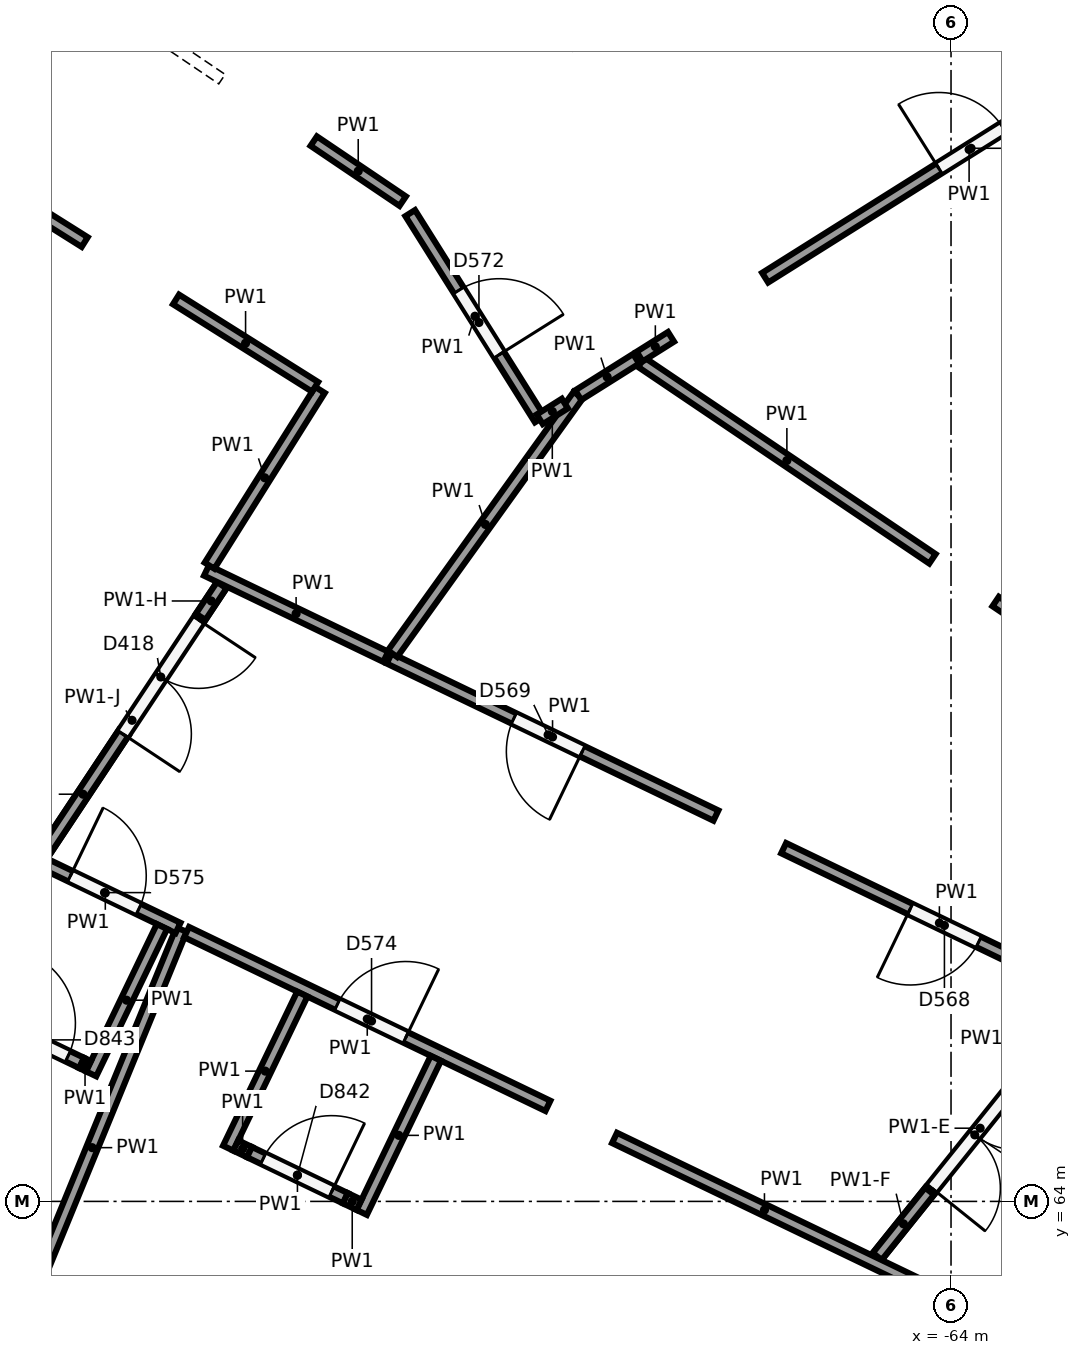
"""IFC4 building model, lengths in metres.
Left out: names, types, materials, properties, quantities, classifications, styles, units other than length and angle.
Written with IfcOpenShell. Run it as: python <this file> out.ifc"""

import sys

from ifc_helpers import new_model, si_unit, direction, frame, frame_2d, origin, origin_2d, place, context, subcontext, project, spatial, rectangle, circle, extrude, element, fill, save


model = new_model("IFC4")
c1 = context("Model", 3, precision=1e-05, world=origin(), true_north=direction((0.0, 1.0)))
c2 = subcontext(c1, "Body", "Model", "MODEL_VIEW")
j1 = project(units=[si_unit("LENGTHUNIT", "METRE"), si_unit("PLANEANGLEUNIT", "RADIAN")], contexts=[c1])
p1 = place(None, origin())
s1 = spatial("IfcSite", under=j1, at=p1, CompositionType="ELEMENT")
p2 = place(p1, origin())
s2 = spatial("IfcBuilding", under=s1, at=p2, CompositionType="ELEMENT")
p3 = place(p2, origin())
s3 = spatial("IfcBuildingStorey", under=s2, at=p3, CompositionType="ELEMENT", Elevation=0.0)
p4 = place(p3, frame((-63.068, 73.47, 0.0), z_axis=(0.0, 0.0, 1.0), x_axis=(1.0, 0.0, 0.0)))
e1 = element("IfcColumn", 1, at=p4, inside=s3, PredefinedType="COLUMN", context=c2, shape_type="SweptSolid", body=[
    extrude(circle(Radius=0.45, at=origin_2d()), origin(), (0.0, 0.0, 1.0), 6.5),
])
p5 = place(p3, frame((-72.312, 79.091, 0.0), z_axis=(0.0, 0.0, 1.0), x_axis=(1.0, 0.0, 0.0)))
e2 = element("IfcColumn", 2, at=p5, inside=s3, PredefinedType="COLUMN", context=c2, shape_type="SweptSolid", body=[
    extrude(circle(Radius=0.5, at=origin_2d()), origin(), (0.0, 0.0, 1.0), 6.5),
])
p6 = place(p3, frame((-67.972, 67.058, 0.0), z_axis=(0.0, 0.0, 1.0), x_axis=(1.0, 0.0, 0.0)))
e3 = element("IfcColumn", 3, at=p6, inside=s3, PredefinedType="COLUMN", context=c2, shape_type="SweptSolid", body=[
    extrude(circle(Radius=0.45, at=origin_2d()), origin(), (0.0, 0.0, 1.0), 6.5),
])
p7 = place(p3, frame((-62.104, 66.677, 0.0), z_axis=(0.0, 0.0, 1.0), x_axis=(-0.901215323509, 0.433371596523, 0.0)))
e4 = element("IfcWall", 4, at=p7, inside=s3, PredefinedType="PARTITIONING", context=c2, shape_type="SweptSolid", body=[
    extrude(rectangle(XDim=4.547, YDim=0.15, at=frame_2d((2.273, 0.0))), origin(), (0.0, 0.0, 1.0), 6.15),
])
p8 = place(p7, frame((1.7, 0.0, 0.0)))
e5 = element("IfcOpeningElement", 5, at=p8, cuts=e4, PredefinedType="OPENING", context=c2, shape_type="SweptSolid", body=[
    extrude(rectangle(XDim=1.0, YDim=2.1, at=frame_2d((0.5, 1.05))), frame((0.0, 0.085, 0.0), z_axis=(0.0, -1.0, 0.0), x_axis=(1.0, 0.0, 0.0)), (0.0, 0.0, 1.0), 0.17),
])
p9 = place(p3, frame((-63.413, 71.893, 0.0), z_axis=(0.0, 0.0, 1.0), x_axis=(0.828828529776, -0.559502697249, 0.0)))
e6 = element("IfcWall", 6, at=p9, inside=s3, PredefinedType="PARTITIONING", context=c2, shape_type="SweptSolid", body=[
    extrude(rectangle(XDim=4.215, YDim=0.15, at=frame_2d((2.107, 0.0))), origin(), (0.0, 0.0, 1.0), 6.15),
])
p10 = place(p3, frame((-67.094, 69.076, 0.0), z_axis=(0.0, 0.0, 1.0), x_axis=(-0.901200145097, 0.433403159284, 0.0)))
e7 = element("IfcWall", 7, at=p10, inside=s3, PredefinedType="PARTITIONING", context=c2, shape_type="SweptSolid", body=[
    extrude(rectangle(XDim=4.77, YDim=0.15, at=frame_2d((2.385, 0.0))), origin(), (0.0, 0.0, 1.0), 6.15),
])
p11 = place(p10, frame((1.95, 0.0, 0.0)))
e8 = element("IfcOpeningElement", 8, at=p11, cuts=e7, PredefinedType="OPENING", context=c2, shape_type="SweptSolid", body=[
    extrude(rectangle(XDim=1.0, YDim=2.1, at=frame_2d((0.5, 1.05))), frame((0.0, 0.085, 0.0), z_axis=(0.0, -1.0, 0.0), x_axis=(1.0, 0.0, 0.0)), (0.0, 0.0, 1.0), 0.17),
])
p12 = place(p3, frame((-71.348, 71.206, 0.0), z_axis=(0.0, 0.0, 1.0), x_axis=(0.583304436704, 0.812253614409, 0.0)))
e9 = element("IfcWall", 9, at=p12, inside=s3, PredefinedType="PARTITIONING", context=c2, shape_type="SweptSolid", body=[
    extrude(rectangle(XDim=4.188, YDim=0.15, at=frame_2d((2.094, 0.0))), origin(), (0.0, 0.0, 1.0), 6.15),
])
p13 = place(p3, frame((-68.905, 74.607, 0.0), z_axis=(0.0, 0.0, 1.0), x_axis=(0.846685421886, 0.532093785311, 0.0)))
e10 = element("IfcWall", 10, at=p13, inside=s3, PredefinedType="PARTITIONING", context=c2, shape_type="SweptSolid", body=[
    extrude(rectangle(XDim=0.9, YDim=0.15, at=frame_2d((0.45, 0.0))), origin(), (0.0, 0.0, 1.0), 6.15),
])
p14 = place(p3, frame((-68.075, 75.04, 0.0), z_axis=(0.0, 0.0, 1.0), x_axis=(0.82883458938, -0.55949372065, 0.0)))
e11 = element("IfcWall", 11, at=p14, inside=s3, PredefinedType="PARTITIONING", context=c2, shape_type="SweptSolid", body=[
    extrude(rectangle(XDim=4.622, YDim=0.15, at=frame_2d((2.311, 0.0))), origin(), (0.0, 0.0, 1.0), 6.15),
])
p15 = place(p3, frame((-68.097, 75.115, 0.0), z_axis=(0.0, 0.0, 1.0), x_axis=(0.8466172136, 0.532202305178, 0.0)))
e12 = element("IfcWall", 12, at=p15, inside=s3, PredefinedType="PARTITIONING", context=c2, shape_type="SweptSolid", body=[
    extrude(rectangle(XDim=0.488, YDim=0.15, at=frame_2d((0.244, 0.0))), origin(), (0.0, 0.0, 1.0), 6.15),
])
p16 = place(p3, frame((-66.446, 76.153, 0.0), z_axis=(0.0, 0.0, 1.0), x_axis=(0.846727774618, 0.532026386272, 0.0)))
e13 = element("IfcWall", 13, at=p16, inside=s3, PredefinedType="PARTITIONING", context=c2, shape_type="SweptSolid", body=[
    extrude(rectangle(XDim=6.338, YDim=0.15, at=frame_2d((3.169, 0.0))), origin(), (0.0, 0.0, 1.0), 6.15),
])
p17 = place(p16, frame((2.7, 0.0, 0.0)))
e14 = element("IfcOpeningElement", 14, at=p17, cuts=e13, PredefinedType="OPENING", context=c2, shape_type="SweptSolid", body=[
    extrude(rectangle(XDim=1.0, YDim=2.1, at=frame_2d((0.5, 1.05))), frame((0.0, 0.085, 0.0), z_axis=(0.0, -1.0, 0.0), x_axis=(1.0, 0.0, 0.0)), (0.0, 0.0, 1.0), 0.17),
])
p18 = place(p3, frame((-78.187, 81.866, 0.0), z_axis=(0.0, 0.0, 1.0), x_axis=(0.828824676241, -0.559508405705, 0.0)))
e15 = element("IfcWall", 15, at=p18, inside=s3, PredefinedType="PARTITIONING", context=c2, shape_type="SweptSolid", body=[
    extrude(rectangle(XDim=5.543, YDim=0.15, at=frame_2d((2.772, 0.0))), origin(), (0.0, 0.0, 1.0), 6.15),
])
p19 = place(p3, frame((-75.398, 76.621, 0.0), z_axis=(0.0, 0.0, 1.0), x_axis=(-0.846738297009, 0.532009639365, 0.0)))
e16 = element("IfcWall", 16, at=p19, inside=s3, PredefinedType="PARTITIONING", context=c2, shape_type="SweptSolid", body=[
    extrude(rectangle(XDim=3.304, YDim=0.15, at=frame_2d((1.652, 0.0))), origin(), (0.0, 0.0, 1.0), 6.15),
])
p20 = place(p19, frame((1.2, 0.0, 0.0)))
e17 = element("IfcOpeningElement", 17, at=p20, cuts=e16, PredefinedType="OPENING", context=c2, shape_type="SweptSolid", body=[
    extrude(rectangle(XDim=1.0, YDim=2.1, at=frame_2d((0.5, 1.05))), frame((0.0, 0.085, 0.0), z_axis=(0.0, -1.0, 0.0), x_axis=(1.0, 0.0, 0.0)), (0.0, 0.0, 1.0), 0.17),
])
p21 = place(p3, frame((-71.437, 71.165, 0.0), z_axis=(0.0, 0.0, 1.0), x_axis=(-0.901204092293, 0.433394951556, 0.0)))
e18 = element("IfcWall", 18, at=p21, inside=s3, PredefinedType="PARTITIONING", context=c2, shape_type="SweptSolid", body=[
    extrude(rectangle(XDim=2.618, YDim=0.15, at=frame_2d((1.309, 0.0))), origin(), (0.0, 0.0, 1.0), 6.15),
])
p22 = place(p3, frame((-73.756, 72.364, 0.0), z_axis=(0.0, 0.0, 1.0), x_axis=(0.532054374811, 0.846710187871, 0.0)))
e19 = element("IfcWall", 19, at=p22, inside=s3, PredefinedType="PARTITIONING", context=c2, shape_type="SweptSolid", body=[
    extrude(rectangle(XDim=2.731, YDim=0.15, at=frame_2d((1.366, 0.0))), origin(), (0.0, 0.0, 1.0), 6.15),
])
p23 = place(p3, frame((-72.366, 74.716, 0.0), z_axis=(0.0, 0.0, 1.0), x_axis=(-0.846758659638, 0.531977229144, 0.0)))
e20 = element("IfcWall", 20, at=p23, inside=s3, PredefinedType="PARTITIONING", context=c2, shape_type="SweptSolid", body=[
    extrude(rectangle(XDim=2.162, YDim=0.15, at=frame_2d((1.081, 0.0))), origin(), (0.0, 0.0, 1.0), 6.15),
])
p24 = place(p3, frame((-72.385, 77.949, 0.0), z_axis=(0.0, 0.0, 1.0), x_axis=(0.828764490946, -0.55959755052, 0.0)))
e21 = element("IfcWall", 21, at=p24, inside=s3, PredefinedType="PARTITIONING", context=c2, shape_type="SweptSolid", body=[
    extrude(rectangle(XDim=1.412, YDim=0.15, at=frame_2d((0.706, 0.0))), origin(), (0.0, 0.0, 1.0), 6.15),
])
p25 = place(p3, frame((-71.115, 77.002, 0.0), z_axis=(0.0, 0.0, 1.0), x_axis=(0.532024845408, -0.846728742791, 0.0)))
e22 = element("IfcWall", 22, at=p25, inside=s3, PredefinedType="PARTITIONING", context=c2, shape_type="SweptSolid", body=[
    extrude(rectangle(XDim=3.204, YDim=0.15, at=frame_2d((1.602, 0.0))), origin(), (0.0, 0.0, 1.0), 6.15),
])
p26 = place(p25, frame((1.2, 0.0, 0.0)))
e23 = element("IfcOpeningElement", 23, at=p26, cuts=e22, PredefinedType="OPENING", context=c2, shape_type="SweptSolid", body=[
    extrude(rectangle(XDim=1.0, YDim=2.1, at=frame_2d((0.5, 1.05))), frame((0.0, 0.085, 0.0), z_axis=(0.0, -1.0, 0.0), x_axis=(1.0, 0.0, 0.0)), (0.0, 0.0, 1.0), 0.17),
])
p27 = place(p3, frame((-69.411, 74.289, 0.0), z_axis=(0.0, 0.0, 1.0), x_axis=(0.84669301854, 0.532081697069, 0.0)))
e24 = element("IfcWall", 24, at=p27, inside=s3, PredefinedType="PARTITIONING", context=c2, shape_type="SweptSolid", body=[
    extrude(rectangle(XDim=0.39, YDim=0.15, at=frame_2d((0.195, 0.0))), origin(), (0.0, 0.0, 1.0), 6.15),
])
p28 = place(p3, frame((-76.476, 61.839, 0.0), z_axis=(0.0, 0.0, 1.0), x_axis=(0.3791112098, 0.92535111747, 0.0)))
e25 = element("IfcWall", 25, at=p28, inside=s3, PredefinedType="PARTITIONING", context=c2, shape_type="SweptSolid", body=[
    extrude(rectangle(XDim=6.2, YDim=0.15, at=frame_2d((3.1, 0.0))), origin(), (0.0, 0.0, 1.0), 6.15),
])
p29 = place(p3, frame((-74.058, 67.543, 0.0), z_axis=(0.0, 0.0, 1.0), x_axis=(0.90118985402, -0.433424557462, 0.0)))
e26 = element("IfcWall", 26, at=p29, inside=s3, PredefinedType="PARTITIONING", context=c2, shape_type="SweptSolid", body=[
    extrude(rectangle(XDim=5.275, YDim=0.15, at=frame_2d((2.638, 0.0))), origin(), (0.0, 0.0, 1.0), 6.15),
])
p30 = place(p29, frame((2.2, 0.0, 0.0)))
e27 = element("IfcOpeningElement", 27, at=p30, cuts=e26, PredefinedType="OPENING", context=c2, shape_type="SweptSolid", body=[
    extrude(rectangle(XDim=1.0, YDim=2.1, at=frame_2d((0.5, 1.05))), frame((0.0, 0.085, 0.0), z_axis=(0.0, -1.0, 0.0), x_axis=(1.0, 0.0, 0.0)), (0.0, 0.0, 1.0), 0.17),
])
p31 = place(p3, frame((-68.427, 64.835, 0.0), z_axis=(0.0, 0.0, 1.0), x_axis=(0.901214723888, -0.433372843459, 0.0)))
e28 = element("IfcWall", 28, at=p31, inside=s3, PredefinedType="PARTITIONING", context=c2, shape_type="SweptSolid", body=[
    extrude(rectangle(XDim=4.377, YDim=0.15, at=frame_2d((2.188, 0.0))), origin(), (0.0, 0.0, 1.0), 6.15),
])
p32 = place(p3, frame((-76.084, 68.518, 0.0), z_axis=(0.0, 0.0, 1.0), x_axis=(0.901196299468, -0.433411155631, 0.0)))
e29 = element("IfcWall", 29, at=p32, inside=s3, PredefinedType="PARTITIONING", context=c2, shape_type="SweptSolid", body=[
    extrude(rectangle(XDim=2.124, YDim=0.15, at=frame_2d((1.062, 0.0))), origin(), (0.0, 0.0, 1.0), 6.15),
])
p33 = place(p32, frame((0.55, 0.0, 0.0)))
e30 = element("IfcOpeningElement", 30, at=p33, cuts=e29, PredefinedType="OPENING", context=c2, shape_type="SweptSolid", body=[
    extrude(rectangle(XDim=1.0, YDim=2.1, at=frame_2d((0.5, 1.05))), frame((0.0, 0.085, 0.0), z_axis=(0.0, -1.0, 0.0), x_axis=(1.0, 0.0, 0.0)), (0.0, 0.0, 1.0), 0.17),
])
p34 = place(p3, frame((-72.535, 66.728, 0.0), z_axis=(0.0, 0.0, 1.0), x_axis=(-0.433401217297, -0.901201079031, 0.0)))
e31 = element("IfcWall", 31, at=p34, inside=s3, PredefinedType="PARTITIONING", context=c2, shape_type="SweptSolid", body=[
    extrude(rectangle(XDim=2.25, YDim=0.15, at=frame_2d((1.125, 0.0))), origin(), (0.0, 0.0, 1.0), 6.15),
])
p35 = place(p3, frame((-70.778, 65.883, 0.0), z_axis=(0.0, 0.0, 1.0), x_axis=(-0.433446957245, -0.901179080569, 0.0)))
e32 = element("IfcWall", 32, at=p35, inside=s3, PredefinedType="PARTITIONING", context=c2, shape_type="SweptSolid", body=[
    extrude(rectangle(XDim=2.25, YDim=0.15, at=frame_2d((1.125, 0.0))), origin(), (0.0, 0.0, 1.0), 6.15),
])
p36 = place(p3, frame((-73.41, 64.735, 0.0), z_axis=(0.0, 0.0, 1.0), x_axis=(0.901160703759, -0.433485162377, 0.0)))
e33 = element("IfcWall", 33, at=p36, inside=s3, PredefinedType="PARTITIONING", context=c2, shape_type="SweptSolid", body=[
    extrude(rectangle(XDim=0.2, YDim=0.15, at=frame_2d((0.1, 0.0))), origin(), (0.0, 0.0, 1.0), 6.15),
])
p37 = place(p3, frame((-73.23, 64.649, 0.0), z_axis=(0.0, 0.0, 1.0), x_axis=(0.901158119361, -0.433490534971, 0.0)))
e34 = element("IfcWall", 34, at=p37, inside=s3, PredefinedType="PARTITIONING", context=c2, shape_type="SweptSolid", body=[
    extrude(rectangle(XDim=1.4, YDim=0.15, at=frame_2d((0.7, 0.0))), origin(), (0.0, 0.0, 1.0), 6.15),
])
p38 = place(p37, frame((0.2, 0.0, 0.0)))
e35 = element("IfcOpeningElement", 35, at=p38, cuts=e34, PredefinedType="OPENING", context=c2, shape_type="SweptSolid", body=[
    extrude(rectangle(XDim=1.0, YDim=2.1, at=frame_2d((0.5, 1.05))), frame((0.0, 0.085, 0.0), z_axis=(0.0, -1.0, 0.0), x_axis=(1.0, 0.0, 0.0)), (0.0, 0.0, 1.0), 0.17),
])
p39 = place(p3, frame((-71.969, 64.042, 0.0), z_axis=(0.0, 0.0, 1.0), x_axis=(0.901160703759, -0.433485162377, 0.0)))
e36 = element("IfcWall", 36, at=p39, inside=s3, PredefinedType="PARTITIONING", context=c2, shape_type="SweptSolid", body=[
    extrude(rectangle(XDim=0.2, YDim=0.15, at=frame_2d((0.1, 0.0))), origin(), (0.0, 0.0, 1.0), 6.15),
])
p40 = place(p3, frame((-74.382, 67.616, 0.0), z_axis=(0.0, 0.0, 1.0), x_axis=(-0.433399074272, -0.90120210964, 0.0)))
e37 = element("IfcWall", 37, at=p40, inside=s3, PredefinedType="PARTITIONING", context=c2, shape_type="SweptSolid", body=[
    extrude(rectangle(XDim=2.15, YDim=0.15, at=frame_2d((1.075, 0.0))), origin(), (0.0, 0.0, 1.0), 6.15),
])
p41 = place(p3, frame((-76.701, 66.428, 0.0), z_axis=(0.0, 0.0, 1.0), x_axis=(0.901226230947, -0.433348913294, 0.0)))
e38 = element("IfcWall", 38, at=p41, inside=s3, PredefinedType="PARTITIONING", context=c2, shape_type="SweptSolid", body=[
    extrude(rectangle(XDim=1.4, YDim=0.15, at=frame_2d((0.7, 0.0))), origin(), (0.0, 0.0, 1.0), 6.15),
])
p42 = place(p41, frame((0.2, 0.0, 0.0)))
e39 = element("IfcOpeningElement", 39, at=p42, cuts=e38, PredefinedType="OPENING", context=c2, shape_type="SweptSolid", body=[
    extrude(rectangle(XDim=1.0, YDim=2.1, at=frame_2d((0.5, 1.05))), frame((0.0, 0.085, 0.0), z_axis=(0.0, -1.0, 0.0), x_axis=(1.0, 0.0, 0.0)), (0.0, 0.0, 1.0), 0.17),
])
p43 = place(p3, frame((-75.439, 65.822, 0.0), z_axis=(0.0, 0.0, 1.0), x_axis=(0.900683407008, -0.434476006633, 0.0)))
e40 = element("IfcWall", 40, at=p43, inside=s3, PredefinedType="PARTITIONING", context=c2, shape_type="SweptSolid", body=[
    extrude(rectangle(XDim=0.1, YDim=0.15, at=frame_2d((0.05, 0.0))), origin(), (0.0, 0.0, 1.0), 6.15),
])
p44 = place(p3, frame((-73.595, 72.108, 0.0), z_axis=(0.0, 0.0, 1.0), x_axis=(-0.552890314707, -0.833254042837, 0.0)))
e41 = element("IfcWall", 41, at=p44, inside=s3, PredefinedType="PARTITIONING", context=c2, shape_type="SweptSolid", body=[
    extrude(rectangle(XDim=4.268, YDim=0.15, at=frame_2d((2.134, 0.0))), origin(), (0.0, 0.0, 1.0), 5.05),
])
p45 = place(p44, frame((0.55, 0.0, 0.0)))
e42 = element("IfcOpeningElement", 42, at=p45, cuts=e41, PredefinedType="OPENING", context=c2, shape_type="SweptSolid", body=[
    extrude(rectangle(XDim=1.8, YDim=2.1, at=frame_2d((0.9, 1.05))), frame((0.0, 0.085, 0.0), z_axis=(0.0, -1.0, 0.0), x_axis=(1.0, 0.0, 0.0)), (0.0, 0.0, 1.0), 0.17),
])
p46 = place(p3, frame((-73.595, 72.108, 5.05), z_axis=(0.0, 0.0, 1.0), x_axis=(-0.552670537612, -0.833399830127, 0.0)))
e43 = element("IfcWall", 43, at=p46, inside=s3, PredefinedType="PARTITIONING", context=c2, shape_type="SweptSolid", body=[
    extrude(rectangle(XDim=0.5, YDim=0.15, at=frame_2d((0.25, 0.0))), origin(), (0.0, 0.0, 1.0), 1.1),
])
p47 = place(p3, frame((-74.886, 70.163, 5.05), z_axis=(0.0, 0.0, 1.0), x_axis=(-0.552921485194, -0.833233359396, 0.0)))
e44 = element("IfcWall", 44, at=p47, inside=s3, PredefinedType="PARTITIONING", context=c2, shape_type="SweptSolid", body=[
    extrude(rectangle(XDim=1.934, YDim=0.15, at=frame_2d((0.967, 0.0))), origin(), (0.0, 0.0, 1.0), 1.1),
])
p48 = place(p3, frame((-62.263, 66.65, 0.0), z_axis=(0.0, 0.0, 1.0), x_axis=(-0.625864340601, -0.77993193752, 0.0)))
e45 = element("IfcWall", 45, at=p48, inside=s3, PredefinedType="PARTITIONING", context=c2, shape_type="SweptSolid", body=[
    extrude(rectangle(XDim=4.326, YDim=0.15, at=frame_2d((2.163, 0.0))), origin(), (0.0, 0.0, 1.0), 5.25),
])
p49 = place(p48, frame((1.376, 0.0, 0.0)))
e46 = element("IfcOpeningElement", 46, at=p49, cuts=e45, PredefinedType="OPENING", context=c2, shape_type="SweptSolid", body=[
    extrude(rectangle(XDim=1.8, YDim=2.1, at=frame_2d((0.9, 1.05))), frame((0.0, 0.085, 0.0), z_axis=(0.0, -1.0, 0.0), x_axis=(1.0, 0.0, 0.0)), (0.0, 0.0, 1.0), 0.17),
])
p50 = place(p3, frame((-64.282, 64.134, 5.25), z_axis=(0.0, 0.0, 1.0), x_axis=(-0.625885246077, -0.779915161247, 0.0)))
e47 = element("IfcWall", 47, at=p50, inside=s3, PredefinedType="PARTITIONING", context=c2, shape_type="SweptSolid", body=[
    extrude(rectangle(XDim=1.1, YDim=0.15, at=frame_2d((0.55, 0.0))), origin(), (0.0, 0.0, 1.0), 0.9),
])
p51 = place(p8, origin())
e48 = element("IfcDoor", 48, at=p51, inside=s3, OperationType="SINGLE_SWING_RIGHT", PredefinedType="DOOR", context=c2, shape_type="SweptSolid", body=[
    extrude(rectangle(XDim=1.0, YDim=2.1, at=frame_2d((0.5, 1.05))), frame((0.0, 0.025, 0.0), z_axis=(0.0, -1.0, 0.0), x_axis=(1.0, 0.0, 0.0)), (0.0, 0.0, 1.0), 0.05),
])
fill(e5, e48)
p52 = place(p11, origin())
e49 = element("IfcDoor", 49, at=p52, inside=s3, OperationType="SINGLE_SWING_LEFT", PredefinedType="DOOR", context=c2, shape_type="SweptSolid", body=[
    extrude(rectangle(XDim=1.0, YDim=2.1, at=frame_2d((0.5, 1.05))), frame((0.0, 0.025, 0.0), z_axis=(0.0, -1.0, 0.0), x_axis=(1.0, 0.0, 0.0)), (0.0, 0.0, 1.0), 0.05),
])
fill(e8, e49)
p53 = place(p17, origin())
e50 = element("IfcDoor", 50, at=p53, inside=s3, OperationType="SINGLE_SWING_LEFT", PredefinedType="DOOR", context=c2, shape_type="SweptSolid", body=[
    extrude(rectangle(XDim=1.0, YDim=2.1, at=frame_2d((0.5, 1.05))), frame((0.0, 0.025, 0.0), z_axis=(0.0, -1.0, 0.0), x_axis=(1.0, 0.0, 0.0)), (0.0, 0.0, 1.0), 0.05),
])
fill(e14, e50)
p54 = place(p26, origin())
e51 = element("IfcDoor", 51, at=p54, inside=s3, OperationType="SINGLE_SWING_RIGHT", PredefinedType="DOOR", context=c2, shape_type="SweptSolid", body=[
    extrude(rectangle(XDim=1.0, YDim=2.1, at=frame_2d((0.5, 1.05))), frame((0.0, 0.025, 0.0), z_axis=(0.0, -1.0, 0.0), x_axis=(1.0, 0.0, 0.0)), (0.0, 0.0, 1.0), 0.05),
])
fill(e23, e51)
p55 = place(p30, origin())
e52 = element("IfcDoor", 52, at=p55, inside=s3, OperationType="SINGLE_SWING_RIGHT", PredefinedType="DOOR", context=c2, shape_type="SweptSolid", body=[
    extrude(rectangle(XDim=1.0, YDim=2.1, at=frame_2d((0.5, 1.05))), frame((0.0, 0.025, 0.0), z_axis=(0.0, -1.0, 0.0), x_axis=(1.0, 0.0, 0.0)), (0.0, 0.0, 1.0), 0.05),
])
fill(e27, e52)
p56 = place(p33, origin())
e53 = element("IfcDoor", 53, at=p56, inside=s3, OperationType="SINGLE_SWING_LEFT", PredefinedType="DOOR", context=c2, shape_type="SweptSolid", body=[
    extrude(rectangle(XDim=1.0, YDim=2.1, at=frame_2d((0.5, 1.05))), frame((0.0, 0.025, 0.0), z_axis=(0.0, -1.0, 0.0), x_axis=(1.0, 0.0, 0.0)), (0.0, 0.0, 1.0), 0.05),
])
fill(e30, e53)
p57 = place(p38, origin())
e54 = element("IfcDoor", 54, at=p57, inside=s3, OperationType="SINGLE_SWING_RIGHT", PredefinedType="DOOR", context=c2, shape_type="SweptSolid", body=[
    extrude(rectangle(XDim=1.0, YDim=2.1, at=frame_2d((0.5, 1.05))), frame((0.0, 0.025, 0.0), z_axis=(0.0, -1.0, 0.0), x_axis=(1.0, 0.0, 0.0)), (0.0, 0.0, 1.0), 0.05),
])
fill(e35, e54)
p58 = place(p42, origin())
e55 = element("IfcDoor", 55, at=p58, inside=s3, OperationType="SINGLE_SWING_LEFT", PredefinedType="DOOR", context=c2, shape_type="SweptSolid", body=[
    extrude(rectangle(XDim=1.0, YDim=2.1, at=frame_2d((0.5, 1.05))), frame((0.0, 0.025, 0.0), z_axis=(0.0, -1.0, 0.0), x_axis=(1.0, 0.0, 0.0)), (0.0, 0.0, 1.0), 0.05),
])
fill(e39, e55)
p59 = place(p45, origin())
e56 = element("IfcDoor", 56, at=p59, inside=s3, OperationType="DOUBLE_DOOR_SINGLE_SWING", PredefinedType="DOOR", context=c2, shape_type="SweptSolid", body=[
    extrude(rectangle(XDim=1.8, YDim=2.1, at=frame_2d((0.9, 1.05))), frame((0.0, 0.025, 0.0), z_axis=(0.0, -1.0, 0.0), x_axis=(1.0, 0.0, 0.0)), (0.0, 0.0, 1.0), 0.05),
])
fill(e42, e56)
p60 = place(p49, origin())
e57 = element("IfcDoor", 57, at=p60, inside=s3, OperationType="DOUBLE_DOOR_SINGLE_SWING", PredefinedType="DOOR", context=c2, shape_type="SweptSolid", body=[
    extrude(rectangle(XDim=1.8, YDim=2.1, at=frame_2d((0.9, 1.05))), frame((0.0, 0.025, 0.0), z_axis=(0.0, -1.0, 0.0), x_axis=(1.0, 0.0, 0.0)), (0.0, 0.0, 1.0), 0.05),
])
fill(e46, e57)
save(model, sys.argv[1])
